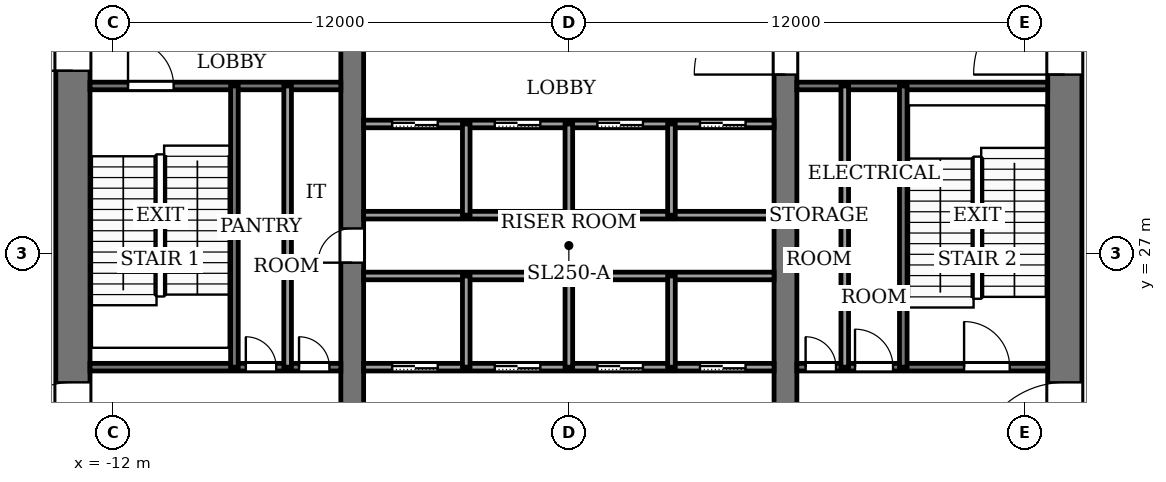
"""IFC4 building model, lengths in metres.
Left out: names, types, materials, properties, quantities, classifications, styles, units other than length and angle.
Written with IfcOpenShell. Run it as: python <this file> out.ifc"""

import sys

from ifc_helpers import new_model, si_unit, direction, frame, frame_2d, origin, place, context, subcontext, project, spatial, rectangle, extrude, element, fill, save


model = new_model("IFC4")
c1 = context("Model", 3, precision=1e-05, world=origin(), true_north=direction((0.0, 1.0)))
c2 = subcontext(c1, "Body", "Model", "MODEL_VIEW")
j1 = project(units=[si_unit("LENGTHUNIT", "METRE"), si_unit("PLANEANGLEUNIT", "RADIAN")], contexts=[c1])
p1 = place(None, origin())
s1 = spatial("IfcSite", under=j1, at=p1, CompositionType="ELEMENT")
p2 = place(p1, origin())
s2 = spatial("IfcBuilding", under=s1, at=p2, CompositionType="ELEMENT")
p3 = place(p2, frame((0.0, 0.0, 177.0)))
s3 = spatial("IfcBuildingStorey", under=s2, at=p3, CompositionType="ELEMENT", Elevation=177.0)
p4 = place(p3, frame((-13.05, 18.4, -0.13), z_axis=(0.0, 0.0, 1.0), x_axis=(0.0, 1.0, 0.0)))
e1 = element("IfcWall", 1, at=p4, inside=s3, PredefinedType="SHEAR", context=c2, shape_type="SweptSolid", body=[
    extrude(rectangle(XDim=19.2, YDim=0.9, at=frame_2d((9.6, 0.0))), origin(), (0.0, 0.0, 1.0), 5.0),
])
p5 = place(p4, frame((2.8, 0.0, 0.13)))
e2 = element("IfcOpeningElement", 2, at=p5, cuts=e1, PredefinedType="OPENING", context=c2, shape_type="SweptSolid", body=[
    extrude(rectangle(XDim=2.4, YDim=2.4, at=frame_2d((1.2, 1.2))), frame((0.0, 0.46, 0.0), z_axis=(0.0, -1.0, 0.0), x_axis=(1.0, 0.0, 0.0)), (0.0, 0.0, 1.0), 0.92),
])
p6 = place(p4, frame((13.4, 0.0, 0.13)))
e3 = element("IfcOpeningElement", 3, at=p6, cuts=e1, PredefinedType="OPENING", context=c2, shape_type="SweptSolid", body=[
    extrude(rectangle(XDim=1.4, YDim=2.2, at=frame_2d((0.7, 1.1))), frame((0.0, 0.46, 0.0), z_axis=(0.0, -1.0, 0.0), x_axis=(1.0, 0.0, 0.0)), (0.0, 0.0, 1.0), 0.92),
])
p7 = place(p3, frame((13.05, 18.4, -0.13), z_axis=(0.0, 0.0, 1.0), x_axis=(0.0, 1.0, 0.0)))
e4 = element("IfcWall", 4, at=p7, inside=s3, PredefinedType="SHEAR", context=c2, shape_type="SweptSolid", body=[
    extrude(rectangle(XDim=19.2, YDim=0.9, at=frame_2d((9.6, 0.0))), origin(), (0.0, 0.0, 1.0), 5.0),
])
p8 = place(p7, frame((2.8, 0.0, 0.13)))
e5 = element("IfcOpeningElement", 5, at=p8, cuts=e4, PredefinedType="OPENING", context=c2, shape_type="SweptSolid", body=[
    extrude(rectangle(XDim=2.4, YDim=2.4, at=frame_2d((1.2, 1.2))), frame((0.0, 0.46, 0.0), z_axis=(0.0, -1.0, 0.0), x_axis=(1.0, 0.0, 0.0)), (0.0, 0.0, 1.0), 0.92),
])
p9 = place(p7, frame((13.3, 0.0, 0.13)))
e6 = element("IfcOpeningElement", 6, at=p9, cuts=e4, PredefinedType="OPENING", context=c2, shape_type="SweptSolid", body=[
    extrude(rectangle(XDim=2.4, YDim=2.4, at=frame_2d((1.2, 1.2))), frame((0.0, 0.46, 0.0), z_axis=(0.0, -1.0, 0.0), x_axis=(1.0, 0.0, 0.0)), (0.0, 0.0, 1.0), 0.92),
])
p10 = place(p3, frame((-5.7, 18.4, -0.13), z_axis=(0.0, 0.0, 1.0), x_axis=(0.0, 1.0, 0.0)))
e7 = element("IfcWall", 7, at=p10, inside=s3, PredefinedType="SHEAR", context=c2, shape_type="SweptSolid", body=[
    extrude(rectangle(XDim=19.2, YDim=0.6, at=frame_2d((9.6, 0.0))), origin(), (0.0, 0.0, 1.0), 5.0),
])
p11 = place(p10, frame((8.35, 0.0, 0.13)))
e8 = element("IfcOpeningElement", 8, at=p11, cuts=e7, PredefinedType="OPENING", context=c2, shape_type="SweptSolid", body=[
    extrude(rectangle(XDim=0.9, YDim=2.1, at=frame_2d((0.45, 1.05))), frame((0.0, 0.31, 0.0), z_axis=(0.0, -1.0, 0.0), x_axis=(1.0, 0.0, 0.0)), (0.0, 0.0, 1.0), 0.62),
])
p12 = place(p3, frame((5.7, 18.4, -0.13), z_axis=(0.0, 0.0, 1.0), x_axis=(0.0, 1.0, 0.0)))
e9 = element("IfcWall", 9, at=p12, inside=s3, PredefinedType="SHEAR", context=c2, shape_type="SweptSolid", body=[
    extrude(rectangle(XDim=19.2, YDim=0.6, at=frame_2d((9.6, 0.0))), origin(), (0.0, 0.0, 1.0), 5.0),
])
p13 = place(p12, frame((13.3, 0.0, 0.13)))
e10 = element("IfcOpeningElement", 10, at=p13, cuts=e9, PredefinedType="OPENING", context=c2, shape_type="SweptSolid", body=[
    extrude(rectangle(XDim=2.4, YDim=2.4, at=frame_2d((1.2, 1.2))), frame((0.0, 0.31, 0.0), z_axis=(0.0, -1.0, 0.0), x_axis=(1.0, 0.0, 0.0)), (0.0, 0.0, 1.0), 0.62),
])
p14 = place(p3, frame((-12.6, 24.0, 0.0), z_axis=(0.0, 0.0, 1.0), x_axis=(1.0, 0.0, 0.0)))
e11 = element("IfcWall", 11, at=p14, inside=s3, PredefinedType="PARTITIONING", context=c2, shape_type="SweptSolid", body=[
    extrude(rectangle(XDim=6.6, YDim=0.2, at=frame_2d((3.3, 0.0))), origin(), (0.0, 0.0, 1.0), 4.87),
])
p15 = place(p14, frame((4.1, 0.0, 0.0)))
e12 = element("IfcOpeningElement", 12, at=p15, cuts=e11, PredefinedType="OPENING", context=c2, shape_type="SweptSolid", body=[
    extrude(rectangle(XDim=0.8, YDim=2.1, at=frame_2d((0.4, 1.05))), frame((0.0, 0.11, 0.0), z_axis=(0.0, -1.0, 0.0), x_axis=(1.0, 0.0, 0.0)), (0.0, 0.0, 1.0), 0.22),
])
p16 = place(p14, frame((5.5, 0.0, 0.0)))
e13 = element("IfcOpeningElement", 13, at=p16, cuts=e11, PredefinedType="OPENING", context=c2, shape_type="SweptSolid", body=[
    extrude(rectangle(XDim=0.8, YDim=2.1, at=frame_2d((0.4, 1.05))), frame((0.0, 0.11, 0.0), z_axis=(0.0, -1.0, 0.0), x_axis=(1.0, 0.0, 0.0)), (0.0, 0.0, 1.0), 0.22),
])
p17 = place(p3, frame((-5.4, 24.0, 0.0), z_axis=(0.0, 0.0, 1.0), x_axis=(1.0, 0.0, 0.0)))
e14 = element("IfcWall", 14, at=p17, inside=s3, PredefinedType="PARTITIONING", context=c2, shape_type="SweptSolid", body=[
    extrude(rectangle(XDim=10.8, YDim=0.2, at=frame_2d((5.4, 0.0))), origin(), (0.0, 0.0, 1.0), 4.87),
])
p18 = place(p17, frame((0.75, 0.0, 0.0)))
e15 = element("IfcOpeningElement", 15, at=p18, cuts=e14, PredefinedType="OPENING", context=c2, shape_type="SweptSolid", body=[
    extrude(rectangle(XDim=1.2, YDim=2.2, at=frame_2d((0.6, 1.1))), frame((0.0, 0.11, 0.0), z_axis=(0.0, -1.0, 0.0), x_axis=(1.0, 0.0, 0.0)), (0.0, 0.0, 1.0), 0.22),
])
p19 = place(p17, frame((3.45, 0.0, 0.0)))
e16 = element("IfcOpeningElement", 16, at=p19, cuts=e14, PredefinedType="OPENING", context=c2, shape_type="SweptSolid", body=[
    extrude(rectangle(XDim=1.2, YDim=2.2, at=frame_2d((0.6, 1.1))), frame((0.0, 0.11, 0.0), z_axis=(0.0, -1.0, 0.0), x_axis=(1.0, 0.0, 0.0)), (0.0, 0.0, 1.0), 0.22),
])
p20 = place(p17, frame((6.15, 0.0, 0.0)))
e17 = element("IfcOpeningElement", 17, at=p20, cuts=e14, PredefinedType="OPENING", context=c2, shape_type="SweptSolid", body=[
    extrude(rectangle(XDim=1.2, YDim=2.2, at=frame_2d((0.6, 1.1))), frame((0.0, 0.11, 0.0), z_axis=(0.0, -1.0, 0.0), x_axis=(1.0, 0.0, 0.0)), (0.0, 0.0, 1.0), 0.22),
])
p21 = place(p17, frame((8.85, 0.0, 0.0)))
e18 = element("IfcOpeningElement", 18, at=p21, cuts=e14, PredefinedType="OPENING", context=c2, shape_type="SweptSolid", body=[
    extrude(rectangle(XDim=1.2, YDim=2.2, at=frame_2d((0.6, 1.1))), frame((0.0, 0.11, 0.0), z_axis=(0.0, -1.0, 0.0), x_axis=(1.0, 0.0, 0.0)), (0.0, 0.0, 1.0), 0.22),
])
p22 = place(p3, frame((6.0, 24.0, 0.0), z_axis=(0.0, 0.0, 1.0), x_axis=(1.0, 0.0, 0.0)))
e19 = element("IfcWall", 19, at=p22, inside=s3, PredefinedType="PARTITIONING", context=c2, shape_type="SweptSolid", body=[
    extrude(rectangle(XDim=6.6, YDim=0.2, at=frame_2d((3.3, 0.0))), origin(), (0.0, 0.0, 1.0), 4.87),
])
p23 = place(p22, frame((0.23, 0.0, 0.0)))
e20 = element("IfcOpeningElement", 20, at=p23, cuts=e19, PredefinedType="OPENING", context=c2, shape_type="SweptSolid", body=[
    extrude(rectangle(XDim=0.8, YDim=2.1, at=frame_2d((0.4, 1.05))), frame((0.0, 0.11, 0.0), z_axis=(0.0, -1.0, 0.0), x_axis=(1.0, 0.0, 0.0)), (0.0, 0.0, 1.0), 0.22),
])
p24 = place(p22, frame((1.53, 0.0, 0.0)))
e21 = element("IfcOpeningElement", 21, at=p24, cuts=e19, PredefinedType="OPENING", context=c2, shape_type="SweptSolid", body=[
    extrude(rectangle(XDim=1.0, YDim=2.1, at=frame_2d((0.5, 1.05))), frame((0.0, 0.11, 0.0), z_axis=(0.0, -1.0, 0.0), x_axis=(1.0, 0.0, 0.0)), (0.0, 0.0, 1.0), 0.22),
])
p25 = place(p22, frame((4.4, 0.0, 0.0)))
e22 = element("IfcOpeningElement", 22, at=p25, cuts=e19, PredefinedType="OPENING", context=c2, shape_type="SweptSolid", body=[
    extrude(rectangle(XDim=1.2, YDim=2.2, at=frame_2d((0.6, 1.1))), frame((0.0, 0.11, 0.0), z_axis=(0.0, -1.0, 0.0), x_axis=(1.0, 0.0, 0.0)), (0.0, 0.0, 1.0), 0.22),
])
for number, where, z_axis, x_axis in (
    (23, (-5.4, 26.4, 0.0), (0.0, 0.0, 1.0), (1.0, 0.0, 0.0)),
    (24, (-5.4, 28.0, 0.0), (0.0, 0.0, 1.0), (1.0, 0.0, 0.0)),
):
    element("IfcWall", number, at=place(p3, frame(where, z_axis=z_axis, x_axis=x_axis)), inside=s3, PredefinedType="PARTITIONING", context=c2, shape_type="SweptSolid", body=[
        extrude(rectangle(XDim=10.8, YDim=0.2, at=frame_2d((5.4, 0.0))), origin(), (0.0, 0.0, 1.0), 4.87),
    ])
p26 = place(p3, frame((-5.4, 30.4, 0.0), z_axis=(0.0, 0.0, 1.0), x_axis=(1.0, 0.0, 0.0)))
e25 = element("IfcWall", 25, at=p26, inside=s3, PredefinedType="PARTITIONING", context=c2, shape_type="SweptSolid", body=[
    extrude(rectangle(XDim=10.8, YDim=0.2, at=frame_2d((5.4, 0.0))), origin(), (0.0, 0.0, 1.0), 4.87),
])
p27 = place(p26, frame((0.75, 0.0, 0.0)))
e26 = element("IfcOpeningElement", 26, at=p27, cuts=e25, PredefinedType="OPENING", context=c2, shape_type="SweptSolid", body=[
    extrude(rectangle(XDim=1.2, YDim=2.2, at=frame_2d((0.6, 1.1))), frame((0.0, 0.11, 0.0), z_axis=(0.0, -1.0, 0.0), x_axis=(1.0, 0.0, 0.0)), (0.0, 0.0, 1.0), 0.22),
])
p28 = place(p26, frame((3.45, 0.0, 0.0)))
e27 = element("IfcOpeningElement", 27, at=p28, cuts=e25, PredefinedType="OPENING", context=c2, shape_type="SweptSolid", body=[
    extrude(rectangle(XDim=1.2, YDim=2.2, at=frame_2d((0.6, 1.1))), frame((0.0, 0.11, 0.0), z_axis=(0.0, -1.0, 0.0), x_axis=(1.0, 0.0, 0.0)), (0.0, 0.0, 1.0), 0.22),
])
p29 = place(p26, frame((6.15, 0.0, 0.0)))
e28 = element("IfcOpeningElement", 28, at=p29, cuts=e25, PredefinedType="OPENING", context=c2, shape_type="SweptSolid", body=[
    extrude(rectangle(XDim=1.2, YDim=2.2, at=frame_2d((0.6, 1.1))), frame((0.0, 0.11, 0.0), z_axis=(0.0, -1.0, 0.0), x_axis=(1.0, 0.0, 0.0)), (0.0, 0.0, 1.0), 0.22),
])
p30 = place(p26, frame((8.85, 0.0, 0.0)))
e29 = element("IfcOpeningElement", 29, at=p30, cuts=e25, PredefinedType="OPENING", context=c2, shape_type="SweptSolid", body=[
    extrude(rectangle(XDim=1.2, YDim=2.2, at=frame_2d((0.6, 1.1))), frame((0.0, 0.11, 0.0), z_axis=(0.0, -1.0, 0.0), x_axis=(1.0, 0.0, 0.0)), (0.0, 0.0, 1.0), 0.22),
])
p31 = place(p3, frame((-12.6, 31.4, 0.0), z_axis=(0.0, 0.0, 1.0), x_axis=(1.0, 0.0, 0.0)))
e30 = element("IfcWall", 30, at=p31, inside=s3, PredefinedType="PARTITIONING", context=c2, shape_type="SweptSolid", body=[
    extrude(rectangle(XDim=6.6, YDim=0.2, at=frame_2d((3.3, 0.0))), origin(), (0.0, 0.0, 1.0), 4.87),
])
p32 = place(p31, frame((1.0, 0.0, 0.0)))
e31 = element("IfcOpeningElement", 31, at=p32, cuts=e30, PredefinedType="OPENING", context=c2, shape_type="SweptSolid", body=[
    extrude(rectangle(XDim=1.2, YDim=2.2, at=frame_2d((0.6, 1.1))), frame((0.0, 0.11, 0.0), z_axis=(0.0, -1.0, 0.0), x_axis=(1.0, 0.0, 0.0)), (0.0, 0.0, 1.0), 0.22),
])
p33 = place(p3, frame((6.0, 31.4, 0.0), z_axis=(0.0, 0.0, 1.0), x_axis=(1.0, 0.0, 0.0)))
e32 = element("IfcWall", 32, at=p33, inside=s3, PredefinedType="PARTITIONING", context=c2, shape_type="SweptSolid", body=[
    extrude(rectangle(XDim=6.6, YDim=0.2, at=frame_2d((3.3, 0.0))), origin(), (0.0, 0.0, 1.0), 4.87),
])
for number, where, z_axis, x_axis in (
    (33, (-8.8, 24.0, 0.0), (0.0, 0.0, 1.0), (0.0, 1.0, 0.0)),
    (34, (-7.4, 24.0, 0.0), (0.0, 0.0, 1.0), (0.0, 1.0, 0.0)),
):
    element("IfcWall", number, at=place(p3, frame(where, z_axis=z_axis, x_axis=x_axis)), inside=s3, PredefinedType="PARTITIONING", context=c2, shape_type="SweptSolid", body=[
        extrude(rectangle(XDim=7.4, YDim=0.2, at=frame_2d((3.7, 0.0))), origin(), (0.0, 0.0, 1.0), 4.87),
    ])
for number, where, z_axis, x_axis in (
    (35, (-2.7, 24.0, 0.0), (0.0, 0.0, 1.0), (0.0, 1.0, 0.0)),
    (36, (-2.7, 28.0, 0.0), (0.0, 0.0, 1.0), (0.0, 1.0, 0.0)),
    (37, (0.0, 24.0, 0.0), (0.0, 0.0, 1.0), (0.0, 1.0, 0.0)),
    (38, (0.0, 28.0, 0.0), (0.0, 0.0, 1.0), (0.0, 1.0, 0.0)),
    (39, (2.7, 24.0, 0.0), (0.0, 0.0, 1.0), (0.0, 1.0, 0.0)),
    (40, (2.7, 28.0, 0.0), (0.0, 0.0, 1.0), (0.0, 1.0, 0.0)),
):
    element("IfcWall", number, at=place(p3, frame(where, z_axis=z_axis, x_axis=x_axis)), inside=s3, PredefinedType="PARTITIONING", context=c2, shape_type="SweptSolid", body=[
        extrude(rectangle(XDim=2.4, YDim=0.2, at=frame_2d((1.2, 0.0))), origin(), (0.0, 0.0, 1.0), 4.87),
    ])
for number, where, z_axis, x_axis in (
    (41, (7.26, 24.0, 0.0), (0.0, 0.0, 1.0), (0.0, 1.0, 0.0)),
    (42, (8.8, 24.0, 0.0), (0.0, 0.0, 1.0), (0.0, 1.0, 0.0)),
):
    element("IfcWall", number, at=place(p3, frame(where, z_axis=z_axis, x_axis=x_axis)), inside=s3, PredefinedType="PARTITIONING", context=c2, shape_type="SweptSolid", body=[
        extrude(rectangle(XDim=7.4, YDim=0.2, at=frame_2d((3.7, 0.0))), origin(), (0.0, 0.0, 1.0), 4.87),
    ])
p34 = place(p18, origin())
e43 = element("IfcDoor", 43, at=p34, inside=s3, OperationType="SLIDING_TO_LEFT", PredefinedType="DOOR", context=c2, shape_type="SweptSolid", body=[
    extrude(rectangle(XDim=1.2, YDim=2.2, at=frame_2d((0.6, 1.1))), frame((0.0, 0.025, 0.0), z_axis=(0.0, -1.0, 0.0), x_axis=(1.0, 0.0, 0.0)), (0.0, 0.0, 1.0), 0.05),
])
fill(e15, e43)
p35 = place(p19, origin())
e44 = element("IfcDoor", 44, at=p35, inside=s3, OperationType="SLIDING_TO_LEFT", PredefinedType="DOOR", context=c2, shape_type="SweptSolid", body=[
    extrude(rectangle(XDim=1.2, YDim=2.2, at=frame_2d((0.6, 1.1))), frame((0.0, 0.025, 0.0), z_axis=(0.0, -1.0, 0.0), x_axis=(1.0, 0.0, 0.0)), (0.0, 0.0, 1.0), 0.05),
])
fill(e16, e44)
p36 = place(p20, origin())
e45 = element("IfcDoor", 45, at=p36, inside=s3, OperationType="SLIDING_TO_LEFT", PredefinedType="DOOR", context=c2, shape_type="SweptSolid", body=[
    extrude(rectangle(XDim=1.2, YDim=2.2, at=frame_2d((0.6, 1.1))), frame((0.0, 0.025, 0.0), z_axis=(0.0, -1.0, 0.0), x_axis=(1.0, 0.0, 0.0)), (0.0, 0.0, 1.0), 0.05),
])
fill(e17, e45)
p37 = place(p21, origin())
e46 = element("IfcDoor", 46, at=p37, inside=s3, OperationType="SLIDING_TO_LEFT", PredefinedType="DOOR", context=c2, shape_type="SweptSolid", body=[
    extrude(rectangle(XDim=1.2, YDim=2.2, at=frame_2d((0.6, 1.1))), frame((0.0, 0.025, 0.0), z_axis=(0.0, -1.0, 0.0), x_axis=(1.0, 0.0, 0.0)), (0.0, 0.0, 1.0), 0.05),
])
fill(e18, e46)
p38 = place(p27, origin())
e47 = element("IfcDoor", 47, at=p38, inside=s3, OperationType="SLIDING_TO_LEFT", PredefinedType="DOOR", context=c2, shape_type="SweptSolid", body=[
    extrude(rectangle(XDim=1.2, YDim=2.2, at=frame_2d((0.6, 1.1))), frame((0.0, 0.025, 0.0), z_axis=(0.0, -1.0, 0.0), x_axis=(1.0, 0.0, 0.0)), (0.0, 0.0, 1.0), 0.05),
])
fill(e26, e47)
p39 = place(p28, origin())
e48 = element("IfcDoor", 48, at=p39, inside=s3, OperationType="SLIDING_TO_LEFT", PredefinedType="DOOR", context=c2, shape_type="SweptSolid", body=[
    extrude(rectangle(XDim=1.2, YDim=2.2, at=frame_2d((0.6, 1.1))), frame((0.0, 0.025, 0.0), z_axis=(0.0, -1.0, 0.0), x_axis=(1.0, 0.0, 0.0)), (0.0, 0.0, 1.0), 0.05),
])
fill(e27, e48)
p40 = place(p29, origin())
e49 = element("IfcDoor", 49, at=p40, inside=s3, OperationType="SLIDING_TO_LEFT", PredefinedType="DOOR", context=c2, shape_type="SweptSolid", body=[
    extrude(rectangle(XDim=1.2, YDim=2.2, at=frame_2d((0.6, 1.1))), frame((0.0, 0.025, 0.0), z_axis=(0.0, -1.0, 0.0), x_axis=(1.0, 0.0, 0.0)), (0.0, 0.0, 1.0), 0.05),
])
fill(e28, e49)
p41 = place(p30, origin())
e50 = element("IfcDoor", 50, at=p41, inside=s3, OperationType="SLIDING_TO_LEFT", PredefinedType="DOOR", context=c2, shape_type="SweptSolid", body=[
    extrude(rectangle(XDim=1.2, YDim=2.2, at=frame_2d((0.6, 1.1))), frame((0.0, 0.025, 0.0), z_axis=(0.0, -1.0, 0.0), x_axis=(1.0, 0.0, 0.0)), (0.0, 0.0, 1.0), 0.05),
])
fill(e29, e50)
p42 = place(p15, origin())
e51 = element("IfcDoor", 51, at=p42, inside=s3, OperationType="SINGLE_SWING_LEFT", PredefinedType="DOOR", context=c2, shape_type="SweptSolid", body=[
    extrude(rectangle(XDim=0.8, YDim=2.1, at=frame_2d((0.4, 1.05))), frame((0.0, 0.025, 0.0), z_axis=(0.0, -1.0, 0.0), x_axis=(1.0, 0.0, 0.0)), (0.0, 0.0, 1.0), 0.05),
])
fill(e12, e51)
p43 = place(p16, origin())
e52 = element("IfcDoor", 52, at=p43, inside=s3, OperationType="SINGLE_SWING_RIGHT", PredefinedType="DOOR", context=c2, shape_type="SweptSolid", body=[
    extrude(rectangle(XDim=0.8, YDim=2.1, at=frame_2d((0.4, 1.05))), frame((0.0, 0.025, 0.0), z_axis=(0.0, -1.0, 0.0), x_axis=(1.0, 0.0, 0.0)), (0.0, 0.0, 1.0), 0.05),
])
fill(e13, e52)
p44 = place(p23, origin())
e53 = element("IfcDoor", 53, at=p44, inside=s3, OperationType="SINGLE_SWING_RIGHT", PredefinedType="DOOR", context=c2, shape_type="SweptSolid", body=[
    extrude(rectangle(XDim=0.8, YDim=2.1, at=frame_2d((0.4, 1.05))), frame((0.0, 0.025, 0.0), z_axis=(0.0, -1.0, 0.0), x_axis=(1.0, 0.0, 0.0)), (0.0, 0.0, 1.0), 0.05),
])
fill(e20, e53)
p45 = place(p24, origin())
e54 = element("IfcDoor", 54, at=p45, inside=s3, OperationType="SINGLE_SWING_LEFT", PredefinedType="DOOR", context=c2, shape_type="SweptSolid", body=[
    extrude(rectangle(XDim=1.0, YDim=2.1, at=frame_2d((0.5, 1.05))), frame((0.0, 0.025, 0.0), z_axis=(0.0, -1.0, 0.0), x_axis=(1.0, 0.0, 0.0)), (0.0, 0.0, 1.0), 0.05),
])
fill(e21, e54)
p46 = place(p11, origin())
e55 = element("IfcDoor", 55, at=p46, inside=s3, OperationType="SINGLE_SWING_RIGHT", PredefinedType="DOOR", context=c2, shape_type="SweptSolid", body=[
    extrude(rectangle(XDim=0.9, YDim=2.1, at=frame_2d((0.45, 1.05))), frame((0.0, 0.025, 0.0), z_axis=(0.0, -1.0, 0.0), x_axis=(1.0, 0.0, 0.0)), (0.0, 0.0, 1.0), 0.05),
])
fill(e8, e55)
p47 = place(p32, origin())
e56 = element("IfcDoor", 56, at=p47, inside=s3, OperationType="SINGLE_SWING_RIGHT", PredefinedType="DOOR", context=c2, shape_type="SweptSolid", body=[
    extrude(rectangle(XDim=1.2, YDim=2.2, at=frame_2d((0.6, 1.1))), frame((0.0, 0.025, 0.0), z_axis=(0.0, -1.0, 0.0), x_axis=(1.0, 0.0, 0.0)), (0.0, 0.0, 1.0), 0.05),
])
fill(e31, e56)
p48 = place(p25, origin())
e57 = element("IfcDoor", 57, at=p48, inside=s3, OperationType="SINGLE_SWING_LEFT", PredefinedType="DOOR", context=c2, shape_type="SweptSolid", body=[
    extrude(rectangle(XDim=1.2, YDim=2.2, at=frame_2d((0.6, 1.1))), frame((0.0, 0.025, 0.0), z_axis=(0.0, -1.0, 0.0), x_axis=(1.0, 0.0, 0.0)), (0.0, 0.0, 1.0), 0.05),
])
fill(e22, e57)
p49 = place(p13, origin())
e58 = element("IfcDoor", 58, at=p49, inside=s3, OperationType="DOUBLE_DOOR_SINGLE_SWING", PredefinedType="DOOR", context=c2, shape_type="SweptSolid", body=[
    extrude(rectangle(XDim=2.4, YDim=2.4, at=frame_2d((1.2, 1.2))), frame((0.0, 0.025, 0.0), z_axis=(0.0, -1.0, 0.0), x_axis=(1.0, 0.0, 0.0)), (0.0, 0.0, 1.0), 0.05),
])
fill(e10, e58)
p50 = place(p5, origin())
e59 = element("IfcDoor", 59, at=p50, inside=s3, OperationType="DOUBLE_DOOR_SINGLE_SWING", PredefinedType="DOOR", context=c2, shape_type="SweptSolid", body=[
    extrude(rectangle(XDim=2.4, YDim=2.4, at=frame_2d((1.2, 1.2))), frame((0.0, 0.025, 0.0), z_axis=(0.0, -1.0, 0.0), x_axis=(1.0, 0.0, 0.0)), (0.0, 0.0, 1.0), 0.05),
])
fill(e2, e59)
p51 = place(p8, origin())
e60 = element("IfcDoor", 60, at=p51, inside=s3, OperationType="DOUBLE_DOOR_SINGLE_SWING", PredefinedType="DOOR", context=c2, shape_type="SweptSolid", body=[
    extrude(rectangle(XDim=2.4, YDim=2.4, at=frame_2d((1.2, 1.2))), frame((0.0, 0.025, 0.0), z_axis=(0.0, -1.0, 0.0), x_axis=(1.0, 0.0, 0.0)), (0.0, 0.0, 1.0), 0.05),
])
fill(e5, e60)
p52 = place(p9, origin())
e61 = element("IfcDoor", 61, at=p52, inside=s3, OperationType="DOUBLE_DOOR_SINGLE_SWING", PredefinedType="DOOR", context=c2, shape_type="SweptSolid", body=[
    extrude(rectangle(XDim=2.4, YDim=2.4, at=frame_2d((1.2, 1.2))), frame((0.0, 0.025, 0.0), z_axis=(0.0, -1.0, 0.0), x_axis=(1.0, 0.0, 0.0)), (0.0, 0.0, 1.0), 0.05),
])
fill(e6, e61)
p53 = place(p6, origin())
e62 = element("IfcDoor", 62, at=p53, inside=s3, OperationType="SINGLE_SWING_RIGHT", PredefinedType="DOOR", context=c2, shape_type="SweptSolid", body=[
    extrude(rectangle(XDim=1.4, YDim=2.2, at=frame_2d((0.7, 1.1))), frame((0.0, 0.025, 0.0), z_axis=(0.0, -1.0, 0.0), x_axis=(1.0, 0.0, 0.0)), (0.0, 0.0, 1.0), 0.05),
])
fill(e3, e62)
save(model, sys.argv[1])
